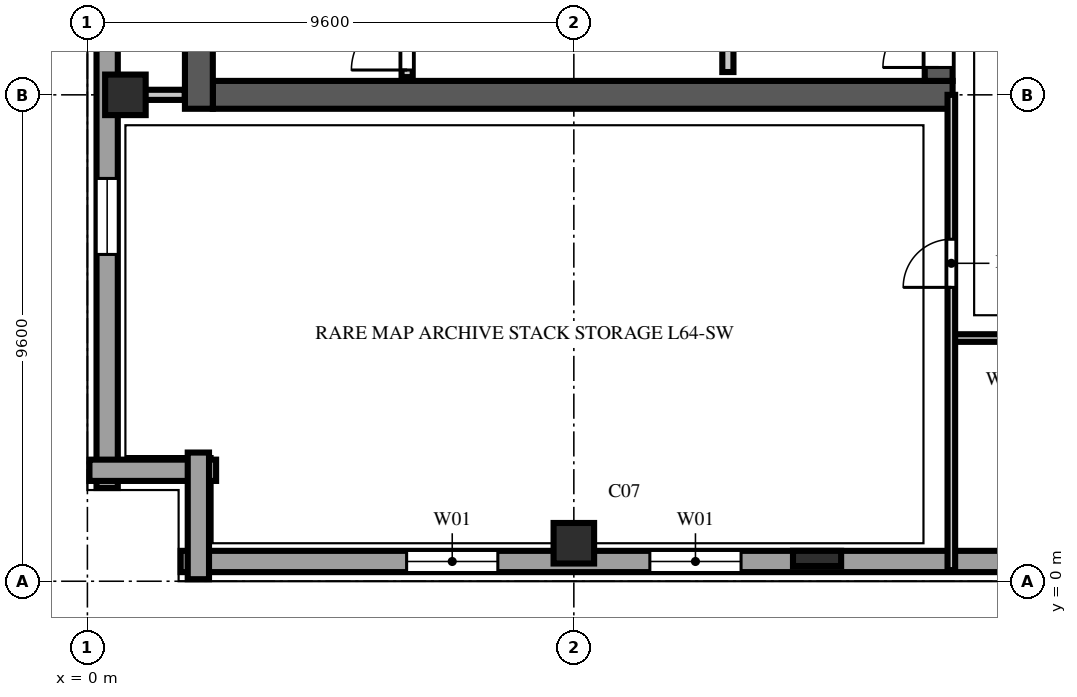
"""IFC4 building model, lengths in metres.
Left out: names, types, materials, properties, quantities, classifications, styles, units other than length and angle.
Written with IfcOpenShell. Run it as: python <this file> out.ifc"""

import sys

from ifc_helpers import new_model, si_unit, direction, frame, frame_2d, origin, origin_2d, place, context, subcontext, project, spatial, rectangle, extrude, element, fill, save


model = new_model("IFC4")
c1 = context("Model", 3, precision=1e-05, world=origin(), true_north=direction((0.0, 1.0)))
c2 = subcontext(c1, "Body", "Model", "MODEL_VIEW")
j1 = project(units=[si_unit("LENGTHUNIT", "METRE"), si_unit("PLANEANGLEUNIT", "RADIAN")], contexts=[c1])
p1 = place(None, origin())
s1 = spatial("IfcSite", under=j1, at=p1, CompositionType="ELEMENT")
p2 = place(p1, origin())
s2 = spatial("IfcBuilding", under=s1, at=p2, CompositionType="ELEMENT")
p3 = place(p2, frame((0.0, 0.0, 252.2)))
s3 = spatial("IfcBuildingStorey", under=s2, at=p3, CompositionType="ELEMENT", Elevation=252.2)
p4 = place(p3, frame((2.475, 9.6, 0.0), z_axis=(0.0, 0.0, 1.0), x_axis=(1.0, 0.0, 0.0)))
e1 = element("IfcWall", 1, at=p4, inside=s3, PredefinedType="SHEAR", context=c2, shape_type="SweptSolid", body=[
    extrude(rectangle(XDim=14.6, YDim=0.55, at=frame_2d((7.3, 0.0))), origin(), (0.0, 0.0, 1.0), 3.48),
])
p5 = place(p3, frame((2.2, 9.325, 0.0), z_axis=(0.0, 0.0, 1.0), x_axis=(0.0, 1.0, 0.0)))
e2 = element("IfcWall", 2, at=p5, inside=s3, PredefinedType="SHEAR", context=c2, shape_type="SweptSolid", body=[
    extrude(rectangle(XDim=38.95, YDim=0.55, at=frame_2d((19.475, 0.0))), origin(), (0.0, 0.0, 1.0), 3.48),
])
p6 = place(p3, frame((16.8, 9.875, 0.0), z_axis=(0.0, 0.0, 1.0), x_axis=(0.0, 1.0, 0.0)))
e3 = element("IfcWall", 3, at=p6, inside=s3, PredefinedType="SHEAR", context=c2, shape_type="SweptSolid", body=[
    extrude(rectangle(XDim=12.525, YDim=0.55, at=frame_2d((6.262, 0.0))), origin(), (0.0, 0.0, 1.0), 3.48),
])
p7 = place(p6, frame((0.265, 0.0, 0.0)))
e4 = element("IfcOpeningElement", 4, at=p7, cuts=e3, PredefinedType="OPENING", context=c2, shape_type="SweptSolid", body=[
    extrude(rectangle(XDim=1.1, YDim=2.2, at=frame_2d((0.55, 1.1))), frame((0.0, 0.287, 0.0), z_axis=(0.0, -1.0, 0.0), x_axis=(1.0, 0.0, 0.0)), (0.0, 0.0, 1.0), 0.574),
])
for number, where, z_axis, x_axis in (
    (5, (0.75, 9.6, 0.0), (0.0, 0.0, 1.0), (1.0, 0.0, 0.0)),
    (6, (9.6, 0.75, 0.0), (0.0, 0.0, 1.0), (1.0, 0.0, 0.0)),
):
    element("IfcColumn", number, at=place(p3, frame(where, z_axis=z_axis, x_axis=x_axis)), inside=s3, PredefinedType="COLUMN", context=c2, shape_type="SweptSolid", body=[
        extrude(rectangle(XDim=0.8, YDim=0.8, at=origin_2d()), origin(), (0.0, 0.0, 1.0), 3.8),
    ])
p8 = place(p3, frame((14.4, 0.45, 0.0), z_axis=(0.0, 0.0, 1.0), x_axis=(1.0, 0.0, 0.0)))
e7 = element("IfcColumn", 7, at=p8, inside=s3, PredefinedType="PILASTER", context=c2, shape_type="SweptSolid", body=[
    extrude(rectangle(XDim=0.95, YDim=0.3, at=origin_2d()), origin(), (0.0, 0.0, 1.0), 3.8),
])
p9 = place(p3, frame((1.84, 0.39, 0.0), z_axis=(0.0, 0.0, 1.0), x_axis=(1.0, 0.0, 0.0)))
e8 = element("IfcWall", 8, at=p9, inside=s3, PredefinedType="SOLIDWALL", context=c2, shape_type="SweptSolid", body=[
    extrude(rectangle(XDim=53.92, YDim=0.42, at=frame_2d((26.96, 0.0))), origin(), (0.0, 0.0, 1.0), 3.48),
])
p10 = place(p9, frame((4.46, 0.0, 0.85)))
e9 = element("IfcOpeningElement", 9, at=p10, cuts=e8, PredefinedType="OPENING", context=c2, shape_type="SweptSolid", body=[
    extrude(rectangle(XDim=1.8, YDim=1.85, at=frame_2d((0.9, 0.925))), frame((0.0, 0.222, 0.0), z_axis=(0.0, -1.0, 0.0), x_axis=(1.0, 0.0, 0.0)), (0.0, 0.0, 1.0), 0.444),
])
p11 = place(p9, frame((9.26, 0.0, 0.85)))
e10 = element("IfcOpeningElement", 10, at=p11, cuts=e8, PredefinedType="OPENING", context=c2, shape_type="SweptSolid", body=[
    extrude(rectangle(XDim=1.8, YDim=1.85, at=frame_2d((0.9, 0.925))), frame((0.0, 0.222, 0.0), z_axis=(0.0, -1.0, 0.0), x_axis=(1.0, 0.0, 0.0)), (0.0, 0.0, 1.0), 0.444),
])
p12 = place(p9, frame((18.86, 0.0, 0.85)))
e11 = element("IfcOpeningElement", 11, at=p12, cuts=e8, PredefinedType="OPENING", context=c2, shape_type="SweptSolid", body=[
    extrude(rectangle(XDim=1.8, YDim=1.85, at=frame_2d((0.9, 0.925))), frame((0.0, 0.222, 0.0), z_axis=(0.0, -1.0, 0.0), x_axis=(1.0, 0.0, 0.0)), (0.0, 0.0, 1.0), 0.444),
])
p13 = place(p9, frame((28.46, 0.0, 0.85)))
e12 = element("IfcOpeningElement", 12, at=p13, cuts=e8, PredefinedType="OPENING", context=c2, shape_type="SweptSolid", body=[
    extrude(rectangle(XDim=1.8, YDim=1.85, at=frame_2d((0.9, 0.925))), frame((0.0, 0.222, 0.0), z_axis=(0.0, -1.0, 0.0), x_axis=(1.0, 0.0, 0.0)), (0.0, 0.0, 1.0), 0.444),
])
p14 = place(p9, frame((33.26, 0.0, 0.85)))
e13 = element("IfcOpeningElement", 13, at=p14, cuts=e8, PredefinedType="OPENING", context=c2, shape_type="SweptSolid", body=[
    extrude(rectangle(XDim=1.8, YDim=1.85, at=frame_2d((0.9, 0.925))), frame((0.0, 0.222, 0.0), z_axis=(0.0, -1.0, 0.0), x_axis=(1.0, 0.0, 0.0)), (0.0, 0.0, 1.0), 0.444),
])
p15 = place(p9, frame((38.06, 0.0, 0.85)))
e14 = element("IfcOpeningElement", 14, at=p15, cuts=e8, PredefinedType="OPENING", context=c2, shape_type="SweptSolid", body=[
    extrude(rectangle(XDim=1.8, YDim=1.85, at=frame_2d((0.9, 0.925))), frame((0.0, 0.222, 0.0), z_axis=(0.0, -1.0, 0.0), x_axis=(1.0, 0.0, 0.0)), (0.0, 0.0, 1.0), 0.444),
])
p16 = place(p9, frame((42.86, 0.0, 0.85)))
e15 = element("IfcOpeningElement", 15, at=p16, cuts=e8, PredefinedType="OPENING", context=c2, shape_type="SweptSolid", body=[
    extrude(rectangle(XDim=1.8, YDim=1.85, at=frame_2d((0.9, 0.925))), frame((0.0, 0.222, 0.0), z_axis=(0.0, -1.0, 0.0), x_axis=(1.0, 0.0, 0.0)), (0.0, 0.0, 1.0), 0.444),
])
p17 = place(p9, frame((47.66, 0.0, 0.85)))
e16 = element("IfcOpeningElement", 16, at=p17, cuts=e8, PredefinedType="OPENING", context=c2, shape_type="SweptSolid", body=[
    extrude(rectangle(XDim=1.8, YDim=1.85, at=frame_2d((0.9, 0.925))), frame((0.0, 0.222, 0.0), z_axis=(0.0, -1.0, 0.0), x_axis=(1.0, 0.0, 0.0)), (0.0, 0.0, 1.0), 0.444),
])
p18 = place(p3, frame((0.39, 55.76, 0.0), z_axis=(0.0, 0.0, 1.0), x_axis=(0.0, -1.0, 0.0)))
e17 = element("IfcWall", 17, at=p18, inside=s3, PredefinedType="SOLIDWALL", context=c2, shape_type="SweptSolid", body=[
    extrude(rectangle(XDim=53.92, YDim=0.42, at=frame_2d((26.96, 0.0))), origin(), (0.0, 0.0, 1.0), 3.48),
])
p19 = place(p18, frame((4.885, 0.0, 0.85)))
e18 = element("IfcOpeningElement", 18, at=p19, cuts=e17, PredefinedType="OPENING", context=c2, shape_type="SweptSolid", body=[
    extrude(rectangle(XDim=0.95, YDim=1.85, at=frame_2d((0.475, 0.925))), frame((0.0, 0.222, 0.0), z_axis=(0.0, -1.0, 0.0), x_axis=(1.0, 0.0, 0.0)), (0.0, 0.0, 1.0), 0.444),
])
p20 = place(p18, frame((9.41, 0.0, 0.85)))
e19 = element("IfcOpeningElement", 19, at=p20, cuts=e17, PredefinedType="OPENING", context=c2, shape_type="SweptSolid", body=[
    extrude(rectangle(XDim=1.5, YDim=1.85, at=frame_2d((0.75, 0.925))), frame((0.0, 0.222, 0.0), z_axis=(0.0, -1.0, 0.0), x_axis=(1.0, 0.0, 0.0)), (0.0, 0.0, 1.0), 0.444),
])
p21 = place(p18, frame((14.485, 0.0, 0.85)))
e20 = element("IfcOpeningElement", 20, at=p21, cuts=e17, PredefinedType="OPENING", context=c2, shape_type="SweptSolid", body=[
    extrude(rectangle(XDim=0.95, YDim=1.85, at=frame_2d((0.475, 0.925))), frame((0.0, 0.222, 0.0), z_axis=(0.0, -1.0, 0.0), x_axis=(1.0, 0.0, 0.0)), (0.0, 0.0, 1.0), 0.444),
])
p22 = place(p18, frame((19.01, 0.0, 0.85)))
e21 = element("IfcOpeningElement", 21, at=p22, cuts=e17, PredefinedType="OPENING", context=c2, shape_type="SweptSolid", body=[
    extrude(rectangle(XDim=1.5, YDim=1.85, at=frame_2d((0.75, 0.925))), frame((0.0, 0.222, 0.0), z_axis=(0.0, -1.0, 0.0), x_axis=(1.0, 0.0, 0.0)), (0.0, 0.0, 1.0), 0.444),
])
p23 = place(p18, frame((24.085, 0.0, 0.85)))
e22 = element("IfcOpeningElement", 22, at=p23, cuts=e17, PredefinedType="OPENING", context=c2, shape_type="SweptSolid", body=[
    extrude(rectangle(XDim=0.95, YDim=1.85, at=frame_2d((0.475, 0.925))), frame((0.0, 0.222, 0.0), z_axis=(0.0, -1.0, 0.0), x_axis=(1.0, 0.0, 0.0)), (0.0, 0.0, 1.0), 0.444),
])
p24 = place(p18, frame((28.61, 0.0, 0.85)))
e23 = element("IfcOpeningElement", 23, at=p24, cuts=e17, PredefinedType="OPENING", context=c2, shape_type="SweptSolid", body=[
    extrude(rectangle(XDim=1.5, YDim=1.85, at=frame_2d((0.75, 0.925))), frame((0.0, 0.222, 0.0), z_axis=(0.0, -1.0, 0.0), x_axis=(1.0, 0.0, 0.0)), (0.0, 0.0, 1.0), 0.444),
])
p25 = place(p18, frame((33.685, 0.0, 0.85)))
e24 = element("IfcOpeningElement", 24, at=p25, cuts=e17, PredefinedType="OPENING", context=c2, shape_type="SweptSolid", body=[
    extrude(rectangle(XDim=0.95, YDim=1.85, at=frame_2d((0.475, 0.925))), frame((0.0, 0.222, 0.0), z_axis=(0.0, -1.0, 0.0), x_axis=(1.0, 0.0, 0.0)), (0.0, 0.0, 1.0), 0.444),
])
p26 = place(p18, frame((38.21, 0.0, 0.85)))
e25 = element("IfcOpeningElement", 25, at=p26, cuts=e17, PredefinedType="OPENING", context=c2, shape_type="SweptSolid", body=[
    extrude(rectangle(XDim=1.5, YDim=1.85, at=frame_2d((0.75, 0.925))), frame((0.0, 0.222, 0.0), z_axis=(0.0, -1.0, 0.0), x_axis=(1.0, 0.0, 0.0)), (0.0, 0.0, 1.0), 0.444),
])
p27 = place(p18, frame((43.285, 0.0, 0.85)))
e26 = element("IfcOpeningElement", 26, at=p27, cuts=e17, PredefinedType="OPENING", context=c2, shape_type="SweptSolid", body=[
    extrude(rectangle(XDim=0.95, YDim=1.85, at=frame_2d((0.475, 0.925))), frame((0.0, 0.222, 0.0), z_axis=(0.0, -1.0, 0.0), x_axis=(1.0, 0.0, 0.0)), (0.0, 0.0, 1.0), 0.444),
])
p28 = place(p18, frame((47.81, 0.0, 0.85)))
e27 = element("IfcOpeningElement", 27, at=p28, cuts=e17, PredefinedType="OPENING", context=c2, shape_type="SweptSolid", body=[
    extrude(rectangle(XDim=1.5, YDim=1.85, at=frame_2d((0.75, 0.925))), frame((0.0, 0.222, 0.0), z_axis=(0.0, -1.0, 0.0), x_axis=(1.0, 0.0, 0.0)), (0.0, 0.0, 1.0), 0.444),
])
for number, where, z_axis, x_axis in (
    (28, (0.04, 2.19, 0.0), (0.0, 0.0, 1.0), (1.0, 0.0, 0.0)),
    (29, (2.19, 2.54, 0.0), (0.0, 0.0, 1.0), (0.0, -1.0, 0.0)),
):
    element("IfcWall", number, at=place(p3, frame(where, z_axis=z_axis, x_axis=x_axis)), inside=s3, PredefinedType="SOLIDWALL", context=c2, shape_type="SweptSolid", body=[
        extrude(rectangle(XDim=2.5, YDim=0.42, at=frame_2d((1.25, 0.0))), origin(), (0.0, 0.0, 1.0), 3.48),
    ])
p29 = place(p3, frame((6.31, 9.95, 0.0), z_axis=(0.0, 0.0, 1.0), x_axis=(0.0, 1.0, 0.0)))
e30 = element("IfcWall", 30, at=p29, inside=s3, PredefinedType="SOLIDWALL", context=c2, shape_type="SweptSolid", body=[
    extrude(rectangle(XDim=7.81, YDim=0.22, at=frame_2d((3.905, 0.0))), origin(), (0.0, 0.0, 1.0), 3.48),
])
p30 = place(p29, frame((0.14, 0.0, 0.0)))
e31 = element("IfcOpeningElement", 31, at=p30, cuts=e30, PredefinedType="OPENING", context=c2, shape_type="SweptSolid", body=[
    extrude(rectangle(XDim=1.1, YDim=2.2, at=frame_2d((0.55, 1.1))), frame((0.0, 0.122, 0.0), z_axis=(0.0, -1.0, 0.0), x_axis=(1.0, 0.0, 0.0)), (0.0, 0.0, 1.0), 0.244),
])
p31 = place(p3, frame((12.64, 10.05, 0.0), z_axis=(0.0, 0.0, 1.0), x_axis=(0.0, 1.0, 0.0)))
e32 = element("IfcWall", 32, at=p31, inside=s3, PredefinedType="SOLIDWALL", context=c2, shape_type="SweptSolid", body=[
    extrude(rectangle(XDim=7.71, YDim=0.22, at=frame_2d((3.855, 0.0))), origin(), (0.0, 0.0, 1.0), 3.48),
])
p32 = place(p3, frame((0.85, 9.6, 0.0), z_axis=(0.0, 0.0, 1.0), x_axis=(1.0, 0.0, 0.0)))
e33 = element("IfcWall", 33, at=p32, inside=s3, PredefinedType="SOLIDWALL", context=c2, shape_type="SweptSolid", body=[
    extrude(rectangle(XDim=1.07, YDim=0.2, at=frame_2d((0.535, 0.0))), origin(), (0.0, 0.0, 1.0), 2.863),
])
p33 = place(p3, frame((17.05, 4.8, 0.0), z_axis=(0.0, 0.0, 1.0), x_axis=(1.0, 0.0, 0.0)))
e34 = element("IfcWall", 34, at=p33, inside=s3, PredefinedType="PARTITIONING", context=c2, shape_type="SweptSolid", body=[
    extrude(rectangle(XDim=2.15, YDim=0.15, at=frame_2d((1.075, 0.0))), origin(), (0.0, 0.0, 1.0), 3.48),
])
p34 = place(p3, frame((17.05, 0.22, 0.0), z_axis=(0.0, 0.0, 1.0), x_axis=(0.0, 1.0, 0.0)))
e35 = element("IfcWall", 35, at=p34, inside=s3, PredefinedType="PARTITIONING", context=c2, shape_type="SweptSolid", body=[
    extrude(rectangle(XDim=9.38, YDim=0.15, at=frame_2d((4.69, 0.0))), origin(), (0.0, 0.0, 1.0), 3.48),
])
p35 = place(p34, frame((5.58, 0.0, 0.0)))
e36 = element("IfcOpeningElement", 36, at=p35, cuts=e35, PredefinedType="OPENING", context=c2, shape_type="SweptSolid", body=[
    extrude(rectangle(XDim=0.95, YDim=2.15, at=frame_2d((0.475, 1.075))), frame((0.0, 0.087, 0.0), z_axis=(0.0, -1.0, 0.0), x_axis=(1.0, 0.0, 0.0)), (0.0, 0.0, 1.0), 0.174),
])
p36 = place(p10, origin())
e37 = element("IfcWindow", 37, at=p36, inside=s3, PartitioningType="DOUBLE_PANEL_VERTICAL", PredefinedType="WINDOW", context=c2, shape_type="SweptSolid", body=[
    extrude(rectangle(XDim=1.8, YDim=1.85, at=frame_2d((0.9, 0.925))), frame((0.0, 0.11, 0.0), z_axis=(0.0, -1.0, 0.0), x_axis=(1.0, 0.0, 0.0)), (0.0, 0.0, 1.0), 0.06),
])
fill(e9, e37)
p37 = place(p11, origin())
e38 = element("IfcWindow", 38, at=p37, inside=s3, PartitioningType="DOUBLE_PANEL_VERTICAL", PredefinedType="WINDOW", context=c2, shape_type="SweptSolid", body=[
    extrude(rectangle(XDim=1.8, YDim=1.85, at=frame_2d((0.9, 0.925))), frame((0.0, 0.11, 0.0), z_axis=(0.0, -1.0, 0.0), x_axis=(1.0, 0.0, 0.0)), (0.0, 0.0, 1.0), 0.06),
])
fill(e10, e38)
p38 = place(p28, origin())
e39 = element("IfcWindow", 39, at=p38, inside=s3, PartitioningType="DOUBLE_PANEL_VERTICAL", PredefinedType="WINDOW", context=c2, shape_type="SweptSolid", body=[
    extrude(rectangle(XDim=1.5, YDim=1.85, at=frame_2d((0.75, 0.925))), frame((0.0, 0.11, 0.0), z_axis=(0.0, -1.0, 0.0), x_axis=(1.0, 0.0, 0.0)), (0.0, 0.0, 1.0), 0.06),
])
fill(e27, e39)
p39 = place(p30, origin())
e40 = element("IfcDoor", 40, at=p39, inside=s3, OperationType="SINGLE_SWING_LEFT", PredefinedType="DOOR", context=c2, shape_type="SweptSolid", body=[
    extrude(rectangle(XDim=1.1, YDim=2.2, at=frame_2d((0.55, 1.1))), frame((0.0, 0.025, 0.0), z_axis=(0.0, -1.0, 0.0), x_axis=(1.0, 0.0, 0.0)), (0.0, 0.0, 1.0), 0.05),
])
fill(e31, e40)
p40 = place(p7, origin())
e41 = element("IfcDoor", 41, at=p40, inside=s3, OperationType="SINGLE_SWING_LEFT", PredefinedType="DOOR", context=c2, shape_type="SweptSolid", body=[
    extrude(rectangle(XDim=1.1, YDim=2.2, at=frame_2d((0.55, 1.1))), frame((0.0, 0.025, 0.0), z_axis=(0.0, -1.0, 0.0), x_axis=(1.0, 0.0, 0.0)), (0.0, 0.0, 1.0), 0.05),
])
fill(e4, e41)
p41 = place(p35, origin())
e42 = element("IfcDoor", 42, at=p41, inside=s3, OperationType="SINGLE_SWING_LEFT", PredefinedType="DOOR", context=c2, shape_type="SweptSolid", body=[
    extrude(rectangle(XDim=0.95, YDim=2.15, at=frame_2d((0.475, 1.075))), frame((0.0, 0.025, 0.0), z_axis=(0.0, -1.0, 0.0), x_axis=(1.0, 0.0, 0.0)), (0.0, 0.0, 1.0), 0.05),
])
fill(e36, e42)
save(model, sys.argv[1])
